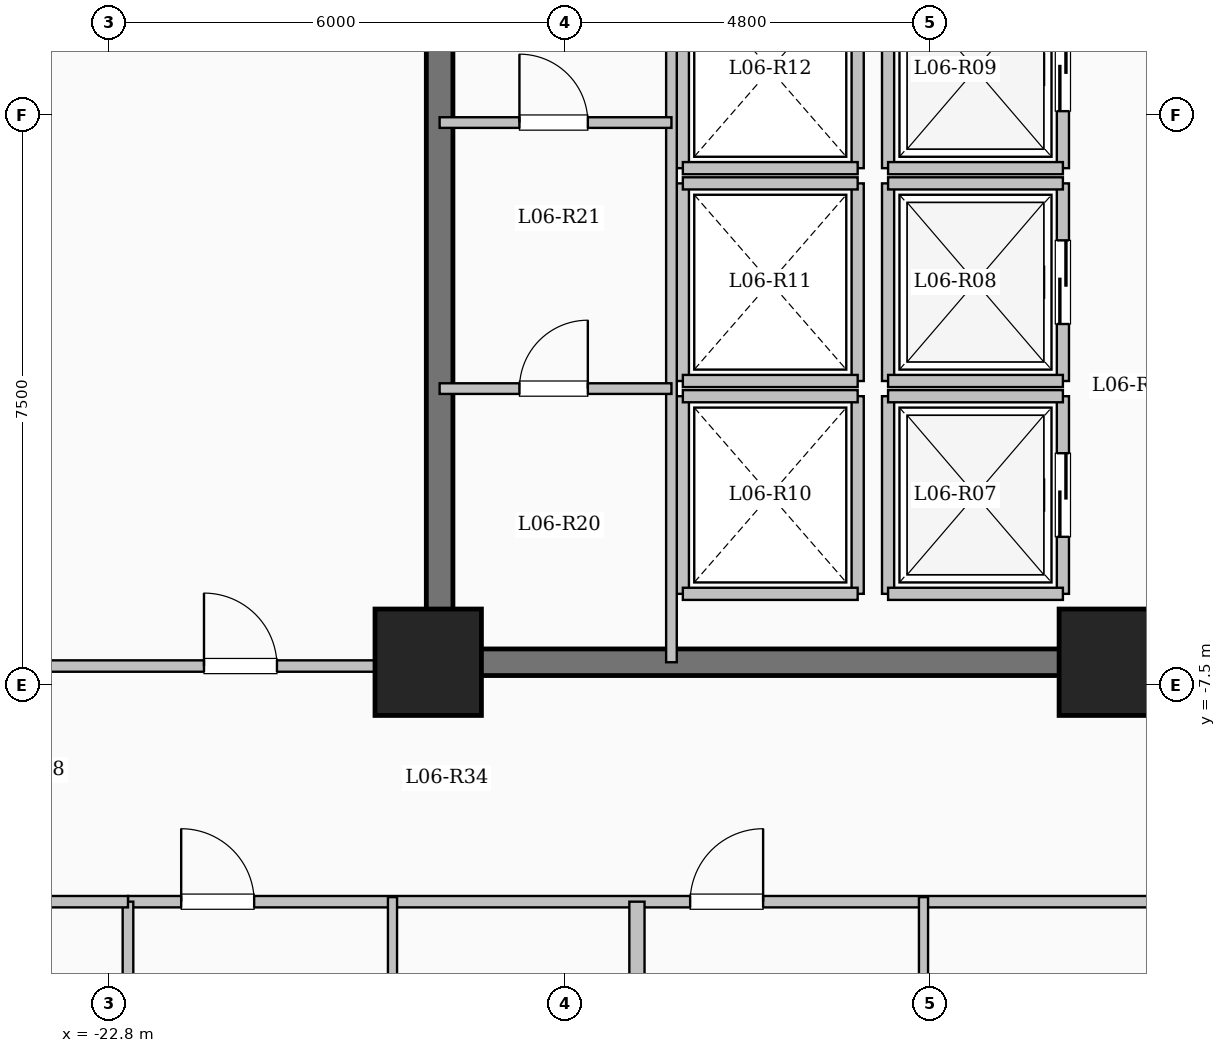
"""IFC4 building model, lengths in metres.
Left out: names, types, materials, properties, quantities, classifications, styles, units other than length and angle.
Written with IfcOpenShell. Run it as: python <this file> out.ifc"""

import sys

from ifc_helpers import new_model, si_unit, direction, frame, frame_2d, origin, origin_2d, place, context, subcontext, project, spatial, rectangle, extrude, element, fill, save


model = new_model("IFC4")
c1 = context("Model", 3, precision=1e-05, world=origin(), true_north=direction((0.0, 1.0)))
c2 = subcontext(c1, "Body", "Model", "MODEL_VIEW")
j1 = project(units=[si_unit("LENGTHUNIT", "METRE"), si_unit("PLANEANGLEUNIT", "RADIAN")], contexts=[c1])
p1 = place(None, origin())
s1 = spatial("IfcSite", under=j1, at=p1, CompositionType="ELEMENT")
p2 = place(p1, origin())
s2 = spatial("IfcBuilding", under=s1, at=p2, CompositionType="ELEMENT")
p3 = place(p2, frame((0.0, 0.0, 27.35)))
s3 = spatial("IfcBuildingStorey", under=s2, at=p3, CompositionType="ELEMENT", Elevation=27.35)
for number, where, z_axis, x_axis in (
    (1, (-9.6, -7.2, 0.0), (0.0, 0.0, 1.0), (1.0, 0.0, 0.0)),
    (2, (-18.6, -7.2, 0.0), (0.0, 0.0, 1.0), (1.0, 0.0, 0.0)),
):
    element("IfcColumn", number, at=place(p3, frame(where, z_axis=z_axis, x_axis=x_axis)), inside=s3, PredefinedType="COLUMN", context=c2, shape_type="SweptSolid", body=[
        extrude(rectangle(XDim=1.4, YDim=1.4, at=origin_2d()), origin(), (0.0, 0.0, 1.0), 3.35),
    ])
p4 = place(p3, frame((-12.55, -6.3, 0.0), z_axis=(0.0, 0.0, 1.0), x_axis=(0.0, 1.0, 0.0)))
e3 = element("IfcWall", 3, at=p4, inside=s3, PredefinedType="SOLIDWALL", context=c2, shape_type="SweptSolid", body=[
    extrude(rectangle(XDim=2.6, YDim=0.16, at=frame_2d((1.3, 0.0))), origin(), (0.0, 0.0, 1.0), 3.1),
])
p5 = place(p3, frame((-10.25, -6.3, 0.0), z_axis=(0.0, 0.0, 1.0), x_axis=(0.0, 1.0, 0.0)))
e4 = element("IfcWall", 4, at=p5, inside=s3, PredefinedType="SOLIDWALL", context=c2, shape_type="SweptSolid", body=[
    extrude(rectangle(XDim=2.6, YDim=0.16, at=frame_2d((1.3, 0.0))), origin(), (0.0, 0.0, 1.0), 3.1),
])
p6 = place(p5, frame((0.75, 0.0, 0.0)))
e5 = element("IfcOpeningElement", 5, at=p6, cuts=e4, PredefinedType="OPENING", context=c2, shape_type="SweptSolid", body=[
    extrude(rectangle(XDim=1.1, YDim=2.15, at=frame_2d((0.55, 1.075))), frame((0.0, 0.09, 0.0), z_axis=(0.0, -1.0, 0.0), x_axis=(1.0, 0.0, 0.0)), (0.0, 0.0, 1.0), 0.18),
])
for number, where, z_axis, x_axis in (
    (6, (-12.55, -6.3, 0.0), (0.0, 0.0, 1.0), (1.0, 0.0, 0.0)),
    (7, (-12.55, -3.7, 0.0), (0.0, 0.0, 1.0), (1.0, 0.0, 0.0)),
):
    element("IfcWall", number, at=place(p3, frame(where, z_axis=z_axis, x_axis=x_axis)), inside=s3, PredefinedType="SOLIDWALL", context=c2, shape_type="SweptSolid", body=[
        extrude(rectangle(XDim=2.3, YDim=0.16, at=frame_2d((1.15, 0.0))), origin(), (0.0, 0.0, 1.0), 3.1),
    ])
p7 = place(p3, frame((-12.55, -3.5, 0.0), z_axis=(0.0, 0.0, 1.0), x_axis=(0.0, 1.0, 0.0)))
e8 = element("IfcWall", 8, at=p7, inside=s3, PredefinedType="SOLIDWALL", context=c2, shape_type="SweptSolid", body=[
    extrude(rectangle(XDim=2.6, YDim=0.16, at=frame_2d((1.3, 0.0))), origin(), (0.0, 0.0, 1.0), 3.1),
])
p8 = place(p3, frame((-10.25, -3.5, 0.0), z_axis=(0.0, 0.0, 1.0), x_axis=(0.0, 1.0, 0.0)))
e9 = element("IfcWall", 9, at=p8, inside=s3, PredefinedType="SOLIDWALL", context=c2, shape_type="SweptSolid", body=[
    extrude(rectangle(XDim=2.6, YDim=0.16, at=frame_2d((1.3, 0.0))), origin(), (0.0, 0.0, 1.0), 3.1),
])
p9 = place(p8, frame((0.75, 0.0, 0.0)))
e10 = element("IfcOpeningElement", 10, at=p9, cuts=e9, PredefinedType="OPENING", context=c2, shape_type="SweptSolid", body=[
    extrude(rectangle(XDim=1.1, YDim=2.15, at=frame_2d((0.55, 1.075))), frame((0.0, 0.09, 0.0), z_axis=(0.0, -1.0, 0.0), x_axis=(1.0, 0.0, 0.0)), (0.0, 0.0, 1.0), 0.18),
])
for number, where, z_axis, x_axis in (
    (11, (-12.55, -3.5, 0.0), (0.0, 0.0, 1.0), (1.0, 0.0, 0.0)),
    (12, (-12.55, -0.9, 0.0), (0.0, 0.0, 1.0), (1.0, 0.0, 0.0)),
):
    element("IfcWall", number, at=place(p3, frame(where, z_axis=z_axis, x_axis=x_axis)), inside=s3, PredefinedType="SOLIDWALL", context=c2, shape_type="SweptSolid", body=[
        extrude(rectangle(XDim=2.3, YDim=0.16, at=frame_2d((1.15, 0.0))), origin(), (0.0, 0.0, 1.0), 3.1),
    ])
p10 = place(p3, frame((-12.55, -0.7, 0.0), z_axis=(0.0, 0.0, 1.0), x_axis=(0.0, 1.0, 0.0)))
e13 = element("IfcWall", 13, at=p10, inside=s3, PredefinedType="SOLIDWALL", context=c2, shape_type="SweptSolid", body=[
    extrude(rectangle(XDim=2.6, YDim=0.16, at=frame_2d((1.3, 0.0))), origin(), (0.0, 0.0, 1.0), 3.1),
])
p11 = place(p3, frame((-10.25, -0.7, 0.0), z_axis=(0.0, 0.0, 1.0), x_axis=(0.0, 1.0, 0.0)))
e14 = element("IfcWall", 14, at=p11, inside=s3, PredefinedType="SOLIDWALL", context=c2, shape_type="SweptSolid", body=[
    extrude(rectangle(XDim=2.6, YDim=0.16, at=frame_2d((1.3, 0.0))), origin(), (0.0, 0.0, 1.0), 3.1),
])
p12 = place(p11, frame((0.75, 0.0, 0.0)))
e15 = element("IfcOpeningElement", 15, at=p12, cuts=e14, PredefinedType="OPENING", context=c2, shape_type="SweptSolid", body=[
    extrude(rectangle(XDim=1.1, YDim=2.15, at=frame_2d((0.55, 1.075))), frame((0.0, 0.09, 0.0), z_axis=(0.0, -1.0, 0.0), x_axis=(1.0, 0.0, 0.0)), (0.0, 0.0, 1.0), 0.18),
])
p13 = place(p3, frame((-12.55, -0.7, 0.0), z_axis=(0.0, 0.0, 1.0), x_axis=(1.0, 0.0, 0.0)))
e16 = element("IfcWall", 16, at=p13, inside=s3, PredefinedType="SOLIDWALL", context=c2, shape_type="SweptSolid", body=[
    extrude(rectangle(XDim=2.3, YDim=0.16, at=frame_2d((1.15, 0.0))), origin(), (0.0, 0.0, 1.0), 3.1),
])
for number, where, z_axis, x_axis in (
    (17, (-15.25, -6.3, 0.0), (0.0, 0.0, 1.0), (0.0, 1.0, 0.0)),
    (18, (-12.95, -6.3, 0.0), (0.0, 0.0, 1.0), (0.0, 1.0, 0.0)),
):
    element("IfcWall", number, at=place(p3, frame(where, z_axis=z_axis, x_axis=x_axis)), inside=s3, PredefinedType="SOLIDWALL", context=c2, shape_type="SweptSolid", body=[
        extrude(rectangle(XDim=2.6, YDim=0.16, at=frame_2d((1.3, 0.0))), origin(), (0.0, 0.0, 1.0), 3.1),
    ])
for number, where, z_axis, x_axis in (
    (19, (-15.25, -6.3, 0.0), (0.0, 0.0, 1.0), (1.0, 0.0, 0.0)),
    (20, (-15.25, -3.7, 0.0), (0.0, 0.0, 1.0), (1.0, 0.0, 0.0)),
):
    element("IfcWall", number, at=place(p3, frame(where, z_axis=z_axis, x_axis=x_axis)), inside=s3, PredefinedType="SOLIDWALL", context=c2, shape_type="SweptSolid", body=[
        extrude(rectangle(XDim=2.3, YDim=0.16, at=frame_2d((1.15, 0.0))), origin(), (0.0, 0.0, 1.0), 3.1),
    ])
for number, where, z_axis, x_axis in (
    (21, (-15.25, -3.5, 0.0), (0.0, 0.0, 1.0), (0.0, 1.0, 0.0)),
    (22, (-12.95, -3.5, 0.0), (0.0, 0.0, 1.0), (0.0, 1.0, 0.0)),
):
    element("IfcWall", number, at=place(p3, frame(where, z_axis=z_axis, x_axis=x_axis)), inside=s3, PredefinedType="SOLIDWALL", context=c2, shape_type="SweptSolid", body=[
        extrude(rectangle(XDim=2.6, YDim=0.16, at=frame_2d((1.3, 0.0))), origin(), (0.0, 0.0, 1.0), 3.1),
    ])
for number, where, z_axis, x_axis in (
    (23, (-15.25, -3.5, 0.0), (0.0, 0.0, 1.0), (1.0, 0.0, 0.0)),
    (24, (-15.25, -0.9, 0.0), (0.0, 0.0, 1.0), (1.0, 0.0, 0.0)),
):
    element("IfcWall", number, at=place(p3, frame(where, z_axis=z_axis, x_axis=x_axis)), inside=s3, PredefinedType="SOLIDWALL", context=c2, shape_type="SweptSolid", body=[
        extrude(rectangle(XDim=2.3, YDim=0.16, at=frame_2d((1.15, 0.0))), origin(), (0.0, 0.0, 1.0), 3.1),
    ])
for number, where, z_axis, x_axis in (
    (25, (-15.25, -0.7, 0.0), (0.0, 0.0, 1.0), (0.0, 1.0, 0.0)),
    (26, (-12.95, -0.7, 0.0), (0.0, 0.0, 1.0), (0.0, 1.0, 0.0)),
):
    element("IfcWall", number, at=place(p3, frame(where, z_axis=z_axis, x_axis=x_axis)), inside=s3, PredefinedType="SOLIDWALL", context=c2, shape_type="SweptSolid", body=[
        extrude(rectangle(XDim=2.6, YDim=0.16, at=frame_2d((1.3, 0.0))), origin(), (0.0, 0.0, 1.0), 3.1),
    ])
p14 = place(p3, frame((-15.25, -0.7, 0.0), z_axis=(0.0, 0.0, 1.0), x_axis=(1.0, 0.0, 0.0)))
e27 = element("IfcWall", 27, at=p14, inside=s3, PredefinedType="SOLIDWALL", context=c2, shape_type="SweptSolid", body=[
    extrude(rectangle(XDim=2.3, YDim=0.16, at=frame_2d((1.15, 0.0))), origin(), (0.0, 0.0, 1.0), 3.1),
])
p15 = place(p3, frame((-18.45, -7.375, 0.0), z_axis=(0.0, 0.0, 1.0), x_axis=(0.0, 1.0, 0.0)))
e28 = element("IfcWall", 28, at=p15, inside=s3, PredefinedType="SHEAR", context=c2, shape_type="SweptSolid", body=[
    extrude(rectangle(XDim=14.05, YDim=0.35, at=frame_2d((7.025, 0.0))), origin(), (0.0, 0.0, 1.0), 3.35),
])
p16 = place(p3, frame((-18.625, -7.2, 0.0), z_axis=(0.0, 0.0, 1.0), x_axis=(1.0, 0.0, 0.0)))
e29 = element("IfcWall", 29, at=p16, inside=s3, PredefinedType="SHEAR", context=c2, shape_type="SweptSolid", body=[
    extrude(rectangle(XDim=8.55, YDim=0.35, at=frame_2d((4.275, 0.0))), origin(), (0.0, 0.0, 1.0), 3.35),
])
p17 = place(p3, frame((-15.4, -7.2, 0.0), z_axis=(0.0, 0.0, 1.0), x_axis=(0.0, 1.0, 0.0)))
e30 = element("IfcWall", 30, at=p17, inside=s3, PredefinedType="PARTITIONING", context=c2, shape_type="SweptSolid", body=[
    extrude(rectangle(XDim=10.45, YDim=0.14, at=frame_2d((5.225, 0.0))), origin(), (0.0, 0.0, 1.0), 3.1),
])
p18 = place(p17, frame((9.25, 0.0, 0.0)))
e31 = element("IfcOpeningElement", 31, at=p18, cuts=e30, PredefinedType="OPENING", context=c2, shape_type="SweptSolid", body=[
    extrude(rectangle(XDim=0.9, YDim=2.08, at=frame_2d((0.45, 1.04))), frame((0.0, 0.08, 0.0), z_axis=(0.0, -1.0, 0.0), x_axis=(1.0, 0.0, 0.0)), (0.0, 0.0, 1.0), 0.16),
])
p19 = place(p3, frame((-18.45, -3.6, 0.0), z_axis=(0.0, 0.0, 1.0), x_axis=(1.0, 0.0, 0.0)))
e32 = element("IfcWall", 32, at=p19, inside=s3, PredefinedType="PARTITIONING", context=c2, shape_type="SweptSolid", body=[
    extrude(rectangle(XDim=3.05, YDim=0.14, at=frame_2d((1.525, 0.0))), origin(), (0.0, 0.0, 1.0), 3.1),
])
p20 = place(p19, frame((1.05, 0.0, 0.0)))
e33 = element("IfcOpeningElement", 33, at=p20, cuts=e32, PredefinedType="OPENING", context=c2, shape_type="SweptSolid", body=[
    extrude(rectangle(XDim=0.9, YDim=2.08, at=frame_2d((0.45, 1.04))), frame((0.0, 0.08, 0.0), z_axis=(0.0, -1.0, 0.0), x_axis=(1.0, 0.0, 0.0)), (0.0, 0.0, 1.0), 0.16),
])
p21 = place(p3, frame((-18.45, -0.1, 0.0), z_axis=(0.0, 0.0, 1.0), x_axis=(1.0, 0.0, 0.0)))
e34 = element("IfcWall", 34, at=p21, inside=s3, PredefinedType="PARTITIONING", context=c2, shape_type="SweptSolid", body=[
    extrude(rectangle(XDim=3.05, YDim=0.14, at=frame_2d((1.525, 0.0))), origin(), (0.0, 0.0, 1.0), 3.1),
])
p22 = place(p21, frame((1.05, 0.0, 0.0)))
e35 = element("IfcOpeningElement", 35, at=p22, cuts=e34, PredefinedType="OPENING", context=c2, shape_type="SweptSolid", body=[
    extrude(rectangle(XDim=0.9, YDim=2.08, at=frame_2d((0.45, 1.04))), frame((0.0, 0.08, 0.0), z_axis=(0.0, -1.0, 0.0), x_axis=(1.0, 0.0, 0.0)), (0.0, 0.0, 1.0), 0.16),
])
p23 = place(p3, frame((-22.55, -10.35, 0.0), z_axis=(0.0, 0.0, 1.0), x_axis=(1.0, 0.0, 0.0)))
e36 = element("IfcWall", 36, at=p23, inside=s3, PredefinedType="PARTITIONING", context=c2, shape_type="SweptSolid", body=[
    extrude(rectangle(XDim=14.0, YDim=0.15, at=frame_2d((7.0, 0.0))), origin(), (0.0, 0.0, 1.0), 3.1),
])
p24 = place(p23, frame((0.7, 0.0, 0.0)))
e37 = element("IfcOpeningElement", 37, at=p24, cuts=e36, PredefinedType="OPENING", context=c2, shape_type="SweptSolid", body=[
    extrude(rectangle(XDim=0.96, YDim=2.15, at=frame_2d((0.48, 1.075))), frame((0.0, 0.085, 0.0), z_axis=(0.0, -1.0, 0.0), x_axis=(1.0, 0.0, 0.0)), (0.0, 0.0, 1.0), 0.17),
])
p25 = place(p23, frame((7.396, 0.0, 0.0)))
e38 = element("IfcOpeningElement", 38, at=p25, cuts=e36, PredefinedType="OPENING", context=c2, shape_type="SweptSolid", body=[
    extrude(rectangle(XDim=0.96, YDim=2.15, at=frame_2d((0.48, 1.075))), frame((0.0, 0.085, 0.0), z_axis=(0.0, -1.0, 0.0), x_axis=(1.0, 0.0, 0.0)), (0.0, 0.0, 1.0), 0.17),
])
p26 = place(p3, frame((-15.854, -23.6, 0.0), z_axis=(0.0, 0.0, 1.0), x_axis=(0.0, 1.0, 0.0)))
e39 = element("IfcWall", 39, at=p26, inside=s3, PredefinedType="SOLIDWALL", context=c2, shape_type="SweptSolid", body=[
    extrude(rectangle(XDim=13.25, YDim=0.2, at=frame_2d((6.625, 0.0))), origin(), (0.0, 0.0, 1.0), 3.1),
])
p27 = place(p3, frame((-19.07, -13.51, 0.0), z_axis=(0.0, 0.0, 1.0), x_axis=(0.0, 1.0, 0.0)))
e40 = element("IfcWall", 40, at=p27, inside=s3, PredefinedType="PARTITIONING", context=c2, shape_type="SweptSolid", body=[
    extrude(rectangle(XDim=3.22, YDim=0.12, at=frame_2d((1.61, 0.0))), origin(), (0.0, 0.0, 1.0), 3.1),
])
p28 = place(p27, frame((1.14, 0.0, 0.0)))
e41 = element("IfcOpeningElement", 41, at=p28, cuts=e40, PredefinedType="OPENING", context=c2, shape_type="SweptSolid", body=[
    extrude(rectangle(XDim=0.88, YDim=2.1, at=frame_2d((0.44, 1.05))), frame((0.0, 0.07, 0.0), z_axis=(0.0, -1.0, 0.0), x_axis=(1.0, 0.0, 0.0)), (0.0, 0.0, 1.0), 0.14),
])
p29 = place(p3, frame((-12.084, -13.51, 0.0), z_axis=(0.0, 0.0, 1.0), x_axis=(0.0, 1.0, 0.0)))
e42 = element("IfcWall", 42, at=p29, inside=s3, PredefinedType="PARTITIONING", context=c2, shape_type="SweptSolid", body=[
    extrude(rectangle(XDim=3.22, YDim=0.12, at=frame_2d((1.61, 0.0))), origin(), (0.0, 0.0, 1.0), 3.1),
])
p30 = place(p29, frame((1.14, 0.0, 0.0)))
e43 = element("IfcOpeningElement", 43, at=p30, cuts=e42, PredefinedType="OPENING", context=c2, shape_type="SweptSolid", body=[
    extrude(rectangle(XDim=0.88, YDim=2.1, at=frame_2d((0.44, 1.05))), frame((0.0, 0.07, 0.0), z_axis=(0.0, -1.0, 0.0), x_axis=(1.0, 0.0, 0.0)), (0.0, 0.0, 1.0), 0.14),
])
p31 = place(p3, frame((-28.68, -7.25, 0.0), z_axis=(0.0, 0.0, 1.0), x_axis=(1.0, 0.0, 0.0)))
e44 = element("IfcWall", 44, at=p31, inside=s3, PredefinedType="PARTITIONING", context=c2, shape_type="SweptSolid", body=[
    extrude(rectangle(XDim=10.23, YDim=0.15, at=frame_2d((5.115, 0.0))), origin(), (0.0, 0.0, 1.0), 3.1),
])
p32 = place(p31, frame((7.13, 0.0, 0.0)))
e45 = element("IfcOpeningElement", 45, at=p32, cuts=e44, PredefinedType="OPENING", context=c2, shape_type="SweptSolid", body=[
    extrude(rectangle(XDim=0.96, YDim=2.15, at=frame_2d((0.48, 1.075))), frame((0.0, 0.085, 0.0), z_axis=(0.0, -1.0, 0.0), x_axis=(1.0, 0.0, 0.0)), (0.0, 0.0, 1.0), 0.17),
])
p33 = place(p3, frame((-22.55, -19.05, 0.0), z_axis=(0.0, 0.0, 1.0), x_axis=(0.0, 1.0, 0.0)))
e46 = element("IfcWall", 46, at=p33, inside=s3, PredefinedType="PARTITIONING", context=c2, shape_type="SweptSolid", body=[
    extrude(rectangle(XDim=8.7, YDim=0.14, at=frame_2d((4.35, 0.0))), origin(), (0.0, 0.0, 1.0), 3.1),
])
p34 = place(p3, frame((-28.68, -10.35, 0.0), z_axis=(0.0, 0.0, 1.0), x_axis=(1.0, 0.0, 0.0)))
e47 = element("IfcWall", 47, at=p34, inside=s3, PredefinedType="PARTITIONING", context=c2, shape_type="SweptSolid", body=[
    extrude(rectangle(XDim=6.13, YDim=0.15, at=frame_2d((3.065, 0.0))), origin(), (0.0, 0.0, 1.0), 3.1),
])
p35 = place(p34, frame((2.59, 0.0, 0.0)))
e48 = element("IfcOpeningElement", 48, at=p35, cuts=e47, PredefinedType="OPENING", context=c2, shape_type="SweptSolid", body=[
    extrude(rectangle(XDim=0.95, YDim=2.15, at=frame_2d((0.475, 1.075))), frame((0.0, 0.085, 0.0), z_axis=(0.0, -1.0, 0.0), x_axis=(1.0, 0.0, 0.0)), (0.0, 0.0, 1.0), 0.17),
])
p36 = place(p6, origin())
e49 = element("IfcDoor", 49, at=p36, inside=s3, OperationType="SLIDING_TO_LEFT", PredefinedType="DOOR", context=c2, shape_type="SweptSolid", body=[
    extrude(rectangle(XDim=1.1, YDim=2.15, at=frame_2d((0.55, 1.075))), frame((0.0, 0.025, 0.0), z_axis=(0.0, -1.0, 0.0), x_axis=(1.0, 0.0, 0.0)), (0.0, 0.0, 1.0), 0.05),
])
fill(e5, e49)
p37 = place(p9, origin())
e50 = element("IfcDoor", 50, at=p37, inside=s3, OperationType="SLIDING_TO_LEFT", PredefinedType="DOOR", context=c2, shape_type="SweptSolid", body=[
    extrude(rectangle(XDim=1.1, YDim=2.15, at=frame_2d((0.55, 1.075))), frame((0.0, 0.025, 0.0), z_axis=(0.0, -1.0, 0.0), x_axis=(1.0, 0.0, 0.0)), (0.0, 0.0, 1.0), 0.05),
])
fill(e10, e50)
p38 = place(p12, origin())
e51 = element("IfcDoor", 51, at=p38, inside=s3, OperationType="SLIDING_TO_LEFT", PredefinedType="DOOR", context=c2, shape_type="SweptSolid", body=[
    extrude(rectangle(XDim=1.1, YDim=2.15, at=frame_2d((0.55, 1.075))), frame((0.0, 0.025, 0.0), z_axis=(0.0, -1.0, 0.0), x_axis=(1.0, 0.0, 0.0)), (0.0, 0.0, 1.0), 0.05),
])
fill(e15, e51)
p39 = place(p22, origin())
e52 = element("IfcDoor", 52, at=p39, inside=s3, OperationType="SINGLE_SWING_LEFT", PredefinedType="DOOR", context=c2, shape_type="SweptSolid", body=[
    extrude(rectangle(XDim=0.9, YDim=2.08, at=frame_2d((0.45, 1.04))), frame((0.0, 0.025, 0.0), z_axis=(0.0, -1.0, 0.0), x_axis=(1.0, 0.0, 0.0)), (0.0, 0.0, 1.0), 0.05),
])
fill(e35, e52)
p40 = place(p20, origin())
e53 = element("IfcDoor", 53, at=p40, inside=s3, OperationType="SINGLE_SWING_RIGHT", PredefinedType="DOOR", context=c2, shape_type="SweptSolid", body=[
    extrude(rectangle(XDim=0.9, YDim=2.08, at=frame_2d((0.45, 1.04))), frame((0.0, 0.025, 0.0), z_axis=(0.0, -1.0, 0.0), x_axis=(1.0, 0.0, 0.0)), (0.0, 0.0, 1.0), 0.05),
])
fill(e33, e53)
p41 = place(p24, origin())
e54 = element("IfcDoor", 54, at=p41, inside=s3, OperationType="SINGLE_SWING_LEFT", PredefinedType="DOOR", context=c2, shape_type="SweptSolid", body=[
    extrude(rectangle(XDim=0.96, YDim=2.15, at=frame_2d((0.48, 1.075))), frame((0.0, 0.025, 0.0), z_axis=(0.0, -1.0, 0.0), x_axis=(1.0, 0.0, 0.0)), (0.0, 0.0, 1.0), 0.05),
])
fill(e37, e54)
p42 = place(p25, origin())
e55 = element("IfcDoor", 55, at=p42, inside=s3, OperationType="SINGLE_SWING_RIGHT", PredefinedType="DOOR", context=c2, shape_type="SweptSolid", body=[
    extrude(rectangle(XDim=0.96, YDim=2.15, at=frame_2d((0.48, 1.075))), frame((0.0, 0.025, 0.0), z_axis=(0.0, -1.0, 0.0), x_axis=(1.0, 0.0, 0.0)), (0.0, 0.0, 1.0), 0.05),
])
fill(e38, e55)
p43 = place(p32, origin())
e56 = element("IfcDoor", 56, at=p43, inside=s3, OperationType="SINGLE_SWING_LEFT", PredefinedType="DOOR", context=c2, shape_type="SweptSolid", body=[
    extrude(rectangle(XDim=0.96, YDim=2.15, at=frame_2d((0.48, 1.075))), frame((0.0, 0.025, 0.0), z_axis=(0.0, -1.0, 0.0), x_axis=(1.0, 0.0, 0.0)), (0.0, 0.0, 1.0), 0.05),
])
fill(e45, e56)
save(model, sys.argv[1])
